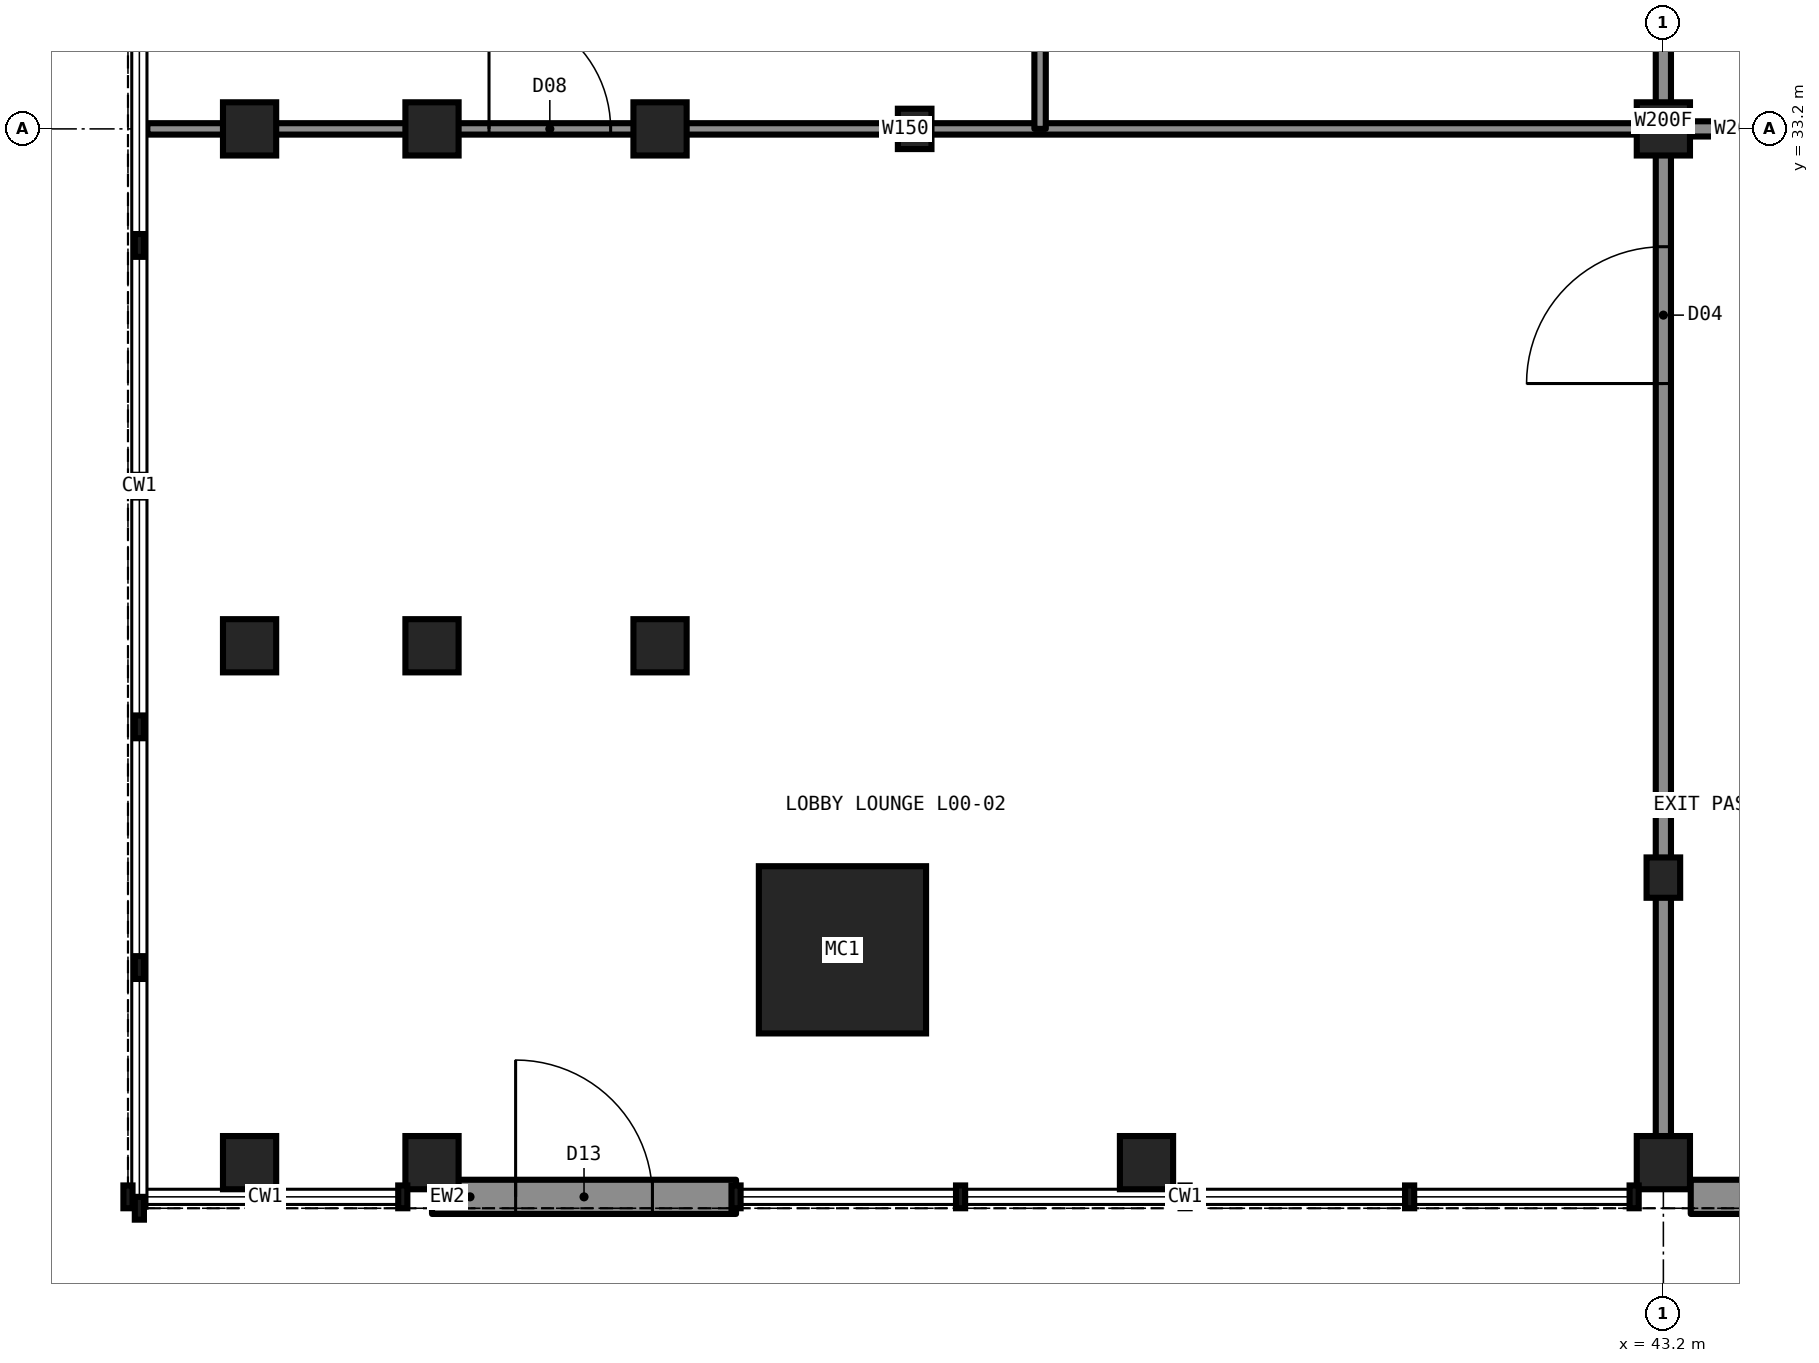
"""IFC4 building model, lengths in metres.
Left out: names, types, materials, properties, quantities, classifications, styles, units other than length and angle.
Written with IfcOpenShell. Run it as: python <this file> out.ifc"""

import sys

from ifc_helpers import new_model, si_unit, direction, frame, frame_2d, origin, origin_2d, place, context, subcontext, project, spatial, rectangle, hollow_rectangle, i_section, extrude, element, fill, save


model = new_model("IFC4")
c1 = context("Model", 3, precision=1e-05, world=origin(), true_north=direction((0.0, 1.0)))
c2 = subcontext(c1, "Body", "Model", "MODEL_VIEW")
j1 = project(units=[si_unit("LENGTHUNIT", "METRE"), si_unit("PLANEANGLEUNIT", "RADIAN")], contexts=[c1])
p1 = place(None, origin())
s1 = spatial("IfcSite", under=j1, at=p1, CompositionType="ELEMENT")
p2 = place(p1, origin())
s2 = spatial("IfcBuilding", under=s1, at=p2, CompositionType="ELEMENT")
p3 = place(p2, origin())
s3 = spatial("IfcBuildingStorey", under=s2, at=p3, CompositionType="ELEMENT", Elevation=0.0)
for number, where, z_axis, x_axis in (
    (1, (33.35, 33.2, 0.0), (0.0, 0.0, 1.0), (1.0, 0.0, 0.0)),
    (2, (43.2, 23.35, 0.0), (0.0, 0.0, 1.0), (1.0, 0.0, 0.0)),
):
    element("IfcColumn", number, at=place(p3, frame(where, z_axis=z_axis, x_axis=x_axis)), inside=s3, PredefinedType="COLUMN", context=c2, shape_type="SweptSolid", body=[
        extrude(i_section(OverallWidth=0.442, OverallDepth=0.531, WebThickness=0.066, FlangeThickness=0.106, at=origin_2d()), origin(), (0.0, 0.0, 1.0), 5.6),
    ])
p4 = place(p3, frame((43.2, 33.2, 0.0), z_axis=(0.0, 0.0, 1.0), x_axis=(1.0, 0.0, 0.0)))
e3 = element("IfcColumn", 3, at=p4, inside=s3, PredefinedType="COLUMN", context=c2, shape_type="SweptSolid", body=[
    extrude(hollow_rectangle(XDim=0.7, YDim=0.7, WallThickness=0.06, at=origin_2d()), origin(), (0.0, 0.0, 1.0), 5.6),
])
p5 = place(p3, frame((32.4, 22.4, 0.0), z_axis=(0.0, 0.0, 1.0), x_axis=(1.0, 0.0, 0.0)))
e4 = element("IfcColumn", 4, at=p5, inside=s3, PredefinedType="COLUMN", context=c2, shape_type="SweptSolid", body=[
    extrude(hollow_rectangle(XDim=2.2, YDim=2.2, WallThickness=0.15, at=origin_2d()), origin(), (0.0, 0.0, 1.0), 5.6),
])
for number, where, z_axis, x_axis in (
    (5, (24.6, 19.6, 0.0), (0.0, 0.0, 1.0), (1.0, 0.0, 0.0)),
    (6, (24.6, 26.4, 0.0), (0.0, 0.0, 1.0), (1.0, 0.0, 0.0)),
    (7, (24.6, 33.2, 0.0), (0.0, 0.0, 1.0), (1.0, 0.0, 0.0)),
    (8, (27.0, 19.6, 0.0), (0.0, 0.0, 1.0), (1.0, 0.0, 0.0)),
    (9, (27.0, 26.4, 0.0), (0.0, 0.0, 1.0), (1.0, 0.0, 0.0)),
    (10, (27.0, 33.2, 0.0), (0.0, 0.0, 1.0), (1.0, 0.0, 0.0)),
    (11, (30.0, 26.4, 0.0), (0.0, 0.0, 1.0), (1.0, 0.0, 0.0)),
    (12, (30.0, 33.2, 0.0), (0.0, 0.0, 1.0), (1.0, 0.0, 0.0)),
    (13, (36.4, 19.6, 0.0), (0.0, 0.0, 1.0), (1.0, 0.0, 0.0)),
    (14, (43.2, 19.6, 0.0), (0.0, 0.0, 1.0), (1.0, 0.0, 0.0)),
):
    element("IfcColumn", number, at=place(p3, frame(where, z_axis=z_axis, x_axis=x_axis)), inside=s3, PredefinedType="COLUMN", context=c2, shape_type="SweptSolid", body=[
        extrude(rectangle(XDim=0.7, YDim=0.7, at=origin_2d()), origin(), (0.0, 0.0, 1.0), 5.6),
    ])
p6 = place(p3, frame((43.2, 33.2, 0.0), z_axis=(0.0, 0.0, 1.0), x_axis=(1.0, 0.0, 0.0)))
e15 = element("IfcWall", 15, at=p6, inside=s3, PredefinedType="PARTITIONING", context=c2, shape_type="SweptSolid", body=[
    extrude(rectangle(XDim=2.1, YDim=0.2, at=frame_2d((1.05, 0.0))), origin(), (0.0, 0.0, 1.0), 5.25),
])
p7 = place(p3, frame((23.255, 33.2, 0.0), z_axis=(0.0, 0.0, 1.0), x_axis=(1.0, 0.0, 0.0)))
e16 = element("IfcWall", 16, at=p7, inside=s3, PredefinedType="PARTITIONING", context=c2, shape_type="SweptSolid", body=[
    extrude(rectangle(XDim=19.945, YDim=0.15, at=frame_2d((9.973, 0.0))), origin(), (0.0, 0.0, 1.0), 5.25),
])
p8 = place(p7, frame((4.495, 0.0, 0.0)))
e17 = element("IfcOpeningElement", 17, at=p8, cuts=e16, PredefinedType="OPENING", context=c2, shape_type="SweptSolid", body=[
    extrude(rectangle(XDim=1.6, YDim=2.4, at=frame_2d((0.8, 1.2))), frame((0.0, 0.085, 0.0), z_axis=(0.0, -1.0, 0.0), x_axis=(1.0, 0.0, 0.0)), (0.0, 0.0, 1.0), 0.17),
])
p9 = place(p3, frame((43.2, 19.3, 0.0), z_axis=(0.0, 0.0, 1.0), x_axis=(0.0, 1.0, 0.0)))
e18 = element("IfcWall", 18, at=p9, inside=s3, PredefinedType="PARTITIONING", context=c2, shape_type="SweptSolid", body=[
    extrude(rectangle(XDim=28.0, YDim=0.2, at=frame_2d((14.0, 0.0))), origin(), (0.0, 0.0, 1.0), 5.25),
])
p10 = place(p9, frame((10.55, 0.0, 0.0)))
e19 = element("IfcOpeningElement", 19, at=p10, cuts=e18, PredefinedType="OPENING", context=c2, shape_type="SweptSolid", body=[
    extrude(rectangle(XDim=1.8, YDim=2.2, at=frame_2d((0.9, 1.1))), frame((0.0, 0.11, 0.0), z_axis=(0.0, -1.0, 0.0), x_axis=(1.0, 0.0, 0.0)), (0.0, 0.0, 1.0), 0.22),
])
p11 = place(p9, frame((26.3, 0.0, 0.0)))
e20 = element("IfcOpeningElement", 20, at=p11, cuts=e18, PredefinedType="OPENING", context=c2, shape_type="SweptSolid", body=[
    extrude(rectangle(XDim=1.0, YDim=2.1, at=frame_2d((0.5, 1.05))), frame((0.0, 0.11, 0.0), z_axis=(0.0, -1.0, 0.0), x_axis=(1.0, 0.0, 0.0)), (0.0, 0.0, 1.0), 0.22),
])
p12 = place(p9, frame((16.35, 0.0, 0.0)))
e21 = element("IfcOpeningElement", 21, at=p12, cuts=e18, PredefinedType="OPENING", context=c2, shape_type="SweptSolid", body=[
    extrude(rectangle(XDim=0.9, YDim=2.1, at=frame_2d((0.45, 1.05))), frame((0.0, 0.11, 0.0), z_axis=(0.0, -1.0, 0.0), x_axis=(1.0, 0.0, 0.0)), (0.0, 0.0, 1.0), 0.22),
])
p13 = place(p9, frame((22.15, 0.0, 0.0)))
e22 = element("IfcOpeningElement", 22, at=p13, cuts=e18, PredefinedType="OPENING", context=c2, shape_type="SweptSolid", body=[
    extrude(rectangle(XDim=0.9, YDim=2.1, at=frame_2d((0.45, 1.05))), frame((0.0, 0.11, 0.0), z_axis=(0.0, -1.0, 0.0), x_axis=(1.0, 0.0, 0.0)), (0.0, 0.0, 1.0), 0.22),
])
p14 = place(p3, frame((35.0, 33.2, 0.0), z_axis=(0.0, 0.0, 1.0), x_axis=(0.0, 1.0, 0.0)))
e23 = element("IfcWall", 23, at=p14, inside=s3, PredefinedType="PARTITIONING", context=c2, shape_type="SweptSolid", body=[
    extrude(rectangle(XDim=23.6, YDim=0.15, at=frame_2d((11.8, 0.0))), origin(), (0.0, 0.0, 1.0), 5.25),
])
p15 = place(p3, frame((27.0, 19.15, 0.0), z_axis=(0.0, 0.0, 1.0), x_axis=(1.0, 0.0, 0.0)))
e24 = element("IfcWall", 24, at=p15, inside=s3, PredefinedType="SOLIDWALL", context=c2, shape_type="SweptSolid", body=[
    extrude(rectangle(XDim=4.0, YDim=0.45, at=frame_2d((2.0, 0.0))), origin(), (0.0, 0.0, 1.0), 5.25),
])
p16 = place(p15, frame((1.1, 0.0, 0.0)))
e25 = element("IfcOpeningElement", 25, at=p16, cuts=e24, PredefinedType="OPENING", context=c2, shape_type="SweptSolid", body=[
    extrude(rectangle(XDim=1.8, YDim=2.4, at=frame_2d((0.9, 1.2))), frame((0.0, 0.235, 0.0), z_axis=(0.0, -1.0, 0.0), x_axis=(1.0, 0.0, 0.0)), (0.0, 0.0, 1.0), 0.47),
])
p17 = place(p3, frame((47.56, 19.15, 0.0), z_axis=(0.0, 0.0, 1.0), x_axis=(-1.0, 0.0, 0.0)))
e26 = element("IfcWall", 26, at=p17, inside=s3, PredefinedType="SOLIDWALL", context=c2, shape_type="SweptSolid", body=[
    extrude(rectangle(XDim=4.0, YDim=0.45, at=frame_2d((2.0, 0.0))), origin(), (0.0, 0.0, 1.0), 5.25),
])
p18 = place(p17, frame((1.1, 0.0, 0.0)))
e27 = element("IfcOpeningElement", 27, at=p18, cuts=e26, PredefinedType="OPENING", context=c2, shape_type="SweptSolid", body=[
    extrude(rectangle(XDim=1.8, YDim=2.4, at=frame_2d((0.9, 1.2))), frame((0.0, 0.235, 0.0), z_axis=(0.0, -1.0, 0.0), x_axis=(1.0, 0.0, 0.0)), (0.0, 0.0, 1.0), 0.47),
])
p19 = place(p10, origin())
e28 = element("IfcDoor", 28, at=p19, inside=s3, OperationType="DOUBLE_DOOR_SINGLE_SWING", PredefinedType="DOOR", context=c2, shape_type="SweptSolid", body=[
    extrude(rectangle(XDim=1.8, YDim=2.2, at=frame_2d((0.9, 1.1))), frame((0.0, 0.025, 0.0), z_axis=(0.0, -1.0, 0.0), x_axis=(1.0, 0.0, 0.0)), (0.0, 0.0, 1.0), 0.05),
])
fill(e19, e28)
p20 = place(p8, origin())
e29 = element("IfcDoor", 29, at=p20, inside=s3, OperationType="DOUBLE_DOOR_SINGLE_SWING", PredefinedType="DOOR", context=c2, shape_type="SweptSolid", body=[
    extrude(rectangle(XDim=1.6, YDim=2.4, at=frame_2d((0.8, 1.2))), frame((0.0, 0.025, 0.0), z_axis=(0.0, -1.0, 0.0), x_axis=(1.0, 0.0, 0.0)), (0.0, 0.0, 1.0), 0.05),
])
fill(e17, e29)
p21 = place(p16, origin())
e30 = element("IfcDoor", 30, at=p21, inside=s3, OperationType="DOUBLE_DOOR_SINGLE_SWING", PredefinedType="DOOR", context=c2, shape_type="SweptSolid", body=[
    extrude(rectangle(XDim=1.8, YDim=2.4, at=frame_2d((0.9, 1.2))), frame((0.0, 0.025, 0.0), z_axis=(0.0, -1.0, 0.0), x_axis=(1.0, 0.0, 0.0)), (0.0, 0.0, 1.0), 0.05),
])
fill(e25, e30)
save(model, sys.argv[1])
